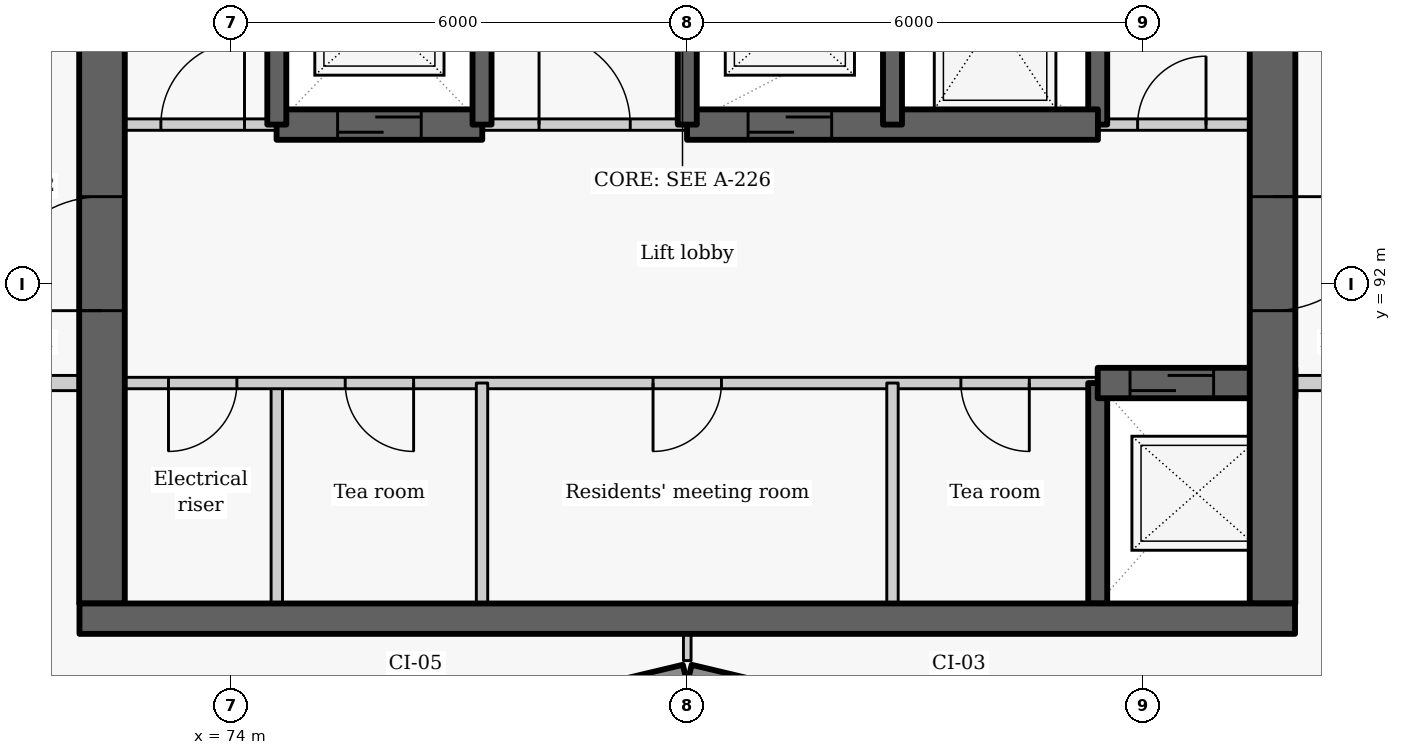
"""IFC4 building model, lengths in metres.
Left out: names, types, materials, properties, quantities, classifications, styles, units other than length and angle.
Written with IfcOpenShell. Run it as: python <this file> out.ifc"""

import sys

from ifc_helpers import new_model, si_unit, direction, frame, frame_2d, origin, place, context, subcontext, project, spatial, rectangle, extrude, element, fill, save


model = new_model("IFC4")
c1 = context("Model", 3, precision=1e-05, world=origin(), true_north=direction((0.0, 1.0)))
c2 = subcontext(c1, "Body", "Model", "MODEL_VIEW")
j1 = project(units=[si_unit("LENGTHUNIT", "METRE"), si_unit("PLANEANGLEUNIT", "RADIAN")], contexts=[c1])
p1 = place(None, origin())
s1 = spatial("IfcSite", under=j1, at=p1, CompositionType="ELEMENT")
p2 = place(p1, origin())
s2 = spatial("IfcBuilding", under=s1, at=p2, CompositionType="ELEMENT")
p3 = place(p2, frame((0.0, 0.0, 140.4)))
s3 = spatial("IfcBuildingStorey", under=s2, at=p3, CompositionType="ELEMENT", Elevation=140.4)
p4 = place(p3, frame((76.814, 86.119, 0.0), z_axis=(0.0, 0.0, 1.0), x_axis=(0.972773113459, 0.231759508395, 0.0)))
e1 = element("IfcWall", 1, at=p4, inside=s3, PredefinedType="SOLIDWALL", context=c2, shape_type="SweptSolid", body=[
    extrude(rectangle(XDim=3.246, YDim=0.25, at=frame_2d((1.623, 0.0))), origin(), (0.0, 0.0, 1.0), 2.425),
])
p5 = place(p4, frame((0.573, 0.0, 0.9)))
e2 = element("IfcOpeningElement", 2, at=p5, cuts=e1, PredefinedType="OPENING", context=c2, shape_type="SweptSolid", body=[
    extrude(rectangle(XDim=2.1, YDim=1.1, at=frame_2d((1.05, 0.55))), frame((0.0, 0.135, 0.0), z_axis=(0.0, -1.0, 0.0), x_axis=(1.0, 0.0, 0.0)), (0.0, 0.0, 1.0), 0.27),
])
p6 = place(p3, frame((80.029, 86.872, 0.0), z_axis=(0.0, 0.0, 1.0), x_axis=(0.972773113459, -0.231759508395, 0.0)))
e3 = element("IfcWall", 3, at=p6, inside=s3, PredefinedType="SOLIDWALL", context=c2, shape_type="SweptSolid", body=[
    extrude(rectangle(XDim=3.246, YDim=0.25, at=frame_2d((1.623, 0.0))), origin(), (0.0, 0.0, 1.0), 2.425),
])
p7 = place(p6, frame((0.573, 0.0, 0.9)))
e4 = element("IfcOpeningElement", 4, at=p7, cuts=e3, PredefinedType="OPENING", context=c2, shape_type="SweptSolid", body=[
    extrude(rectangle(XDim=2.1, YDim=1.1, at=frame_2d((1.05, 0.55))), frame((0.0, 0.135, 0.0), z_axis=(0.0, -1.0, 0.0), x_axis=(1.0, 0.0, 0.0)), (0.0, 0.0, 1.0), 0.27),
])
p8 = place(p3, frame((74.6, 87.8, 0.0), z_axis=(0.0, 0.0, 1.0), x_axis=(0.0, 1.0, 0.0)))
e5 = element("IfcWall", 5, at=p8, inside=s3, PredefinedType="PARTITIONING", context=c2, shape_type="SweptSolid", body=[
    extrude(rectangle(XDim=2.9, YDim=0.15, at=frame_2d((1.45, 0.0))), origin(), (0.0, 0.0, 1.0), 3.025),
])
p9 = place(p3, frame((85.4, 90.7, 0.0), z_axis=(0.0, 0.0, 1.0), x_axis=(-1.0, 0.0, 0.0)))
e6 = element("IfcWall", 6, at=p9, inside=s3, PredefinedType="PARTITIONING", context=c2, shape_type="SweptSolid", body=[
    extrude(rectangle(XDim=13.4, YDim=0.15, at=frame_2d((6.7, 0.0))), origin(), (0.0, 0.0, 1.0), 3.025),
])
p10 = place(p9, frame((11.325, 0.0, 0.0)))
e7 = element("IfcOpeningElement", 7, at=p10, cuts=e6, PredefinedType="OPENING", context=c2, shape_type="SweptSolid", body=[
    extrude(rectangle(XDim=0.9, YDim=2.1, at=frame_2d((0.45, 1.05))), frame((0.0, 0.085, 0.0), z_axis=(0.0, -1.0, 0.0), x_axis=(1.0, 0.0, 0.0)), (0.0, 0.0, 1.0), 0.17),
])
p11 = place(p9, frame((9.0, 0.0, 0.0)))
e8 = element("IfcOpeningElement", 8, at=p11, cuts=e6, PredefinedType="OPENING", context=c2, shape_type="SweptSolid", body=[
    extrude(rectangle(XDim=0.9, YDim=2.1, at=frame_2d((0.45, 1.05))), frame((0.0, 0.085, 0.0), z_axis=(0.0, -1.0, 0.0), x_axis=(1.0, 0.0, 0.0)), (0.0, 0.0, 1.0), 0.17),
])
p12 = place(p9, frame((4.95, 0.0, 0.0)))
e9 = element("IfcOpeningElement", 9, at=p12, cuts=e6, PredefinedType="OPENING", context=c2, shape_type="SweptSolid", body=[
    extrude(rectangle(XDim=0.9, YDim=2.1, at=frame_2d((0.45, 1.05))), frame((0.0, 0.085, 0.0), z_axis=(0.0, -1.0, 0.0), x_axis=(1.0, 0.0, 0.0)), (0.0, 0.0, 1.0), 0.17),
])
p13 = place(p9, frame((0.9, 0.0, 0.0)))
e10 = element("IfcOpeningElement", 10, at=p13, cuts=e6, PredefinedType="OPENING", context=c2, shape_type="SweptSolid", body=[
    extrude(rectangle(XDim=0.9, YDim=2.1, at=frame_2d((0.45, 1.05))), frame((0.0, 0.085, 0.0), z_axis=(0.0, -1.0, 0.0), x_axis=(1.0, 0.0, 0.0)), (0.0, 0.0, 1.0), 0.17),
])
p14 = place(p3, frame((72.3, 87.8, -0.275), z_axis=(0.0, 0.0, 1.0), x_axis=(0.0, 1.0, 0.0)))
e11 = element("IfcWall", 11, at=p14, inside=s3, PredefinedType="SHEAR", context=c2, shape_type="SweptSolid", body=[
    extrude(rectangle(XDim=9.1, YDim=0.6, at=frame_2d((4.55, 0.0))), origin(), (0.0, 0.0, 1.0), 3.3),
])
p15 = place(p14, frame((3.852, 0.0, 0.275)))
e12 = element("IfcOpeningElement", 12, at=p15, cuts=e11, PredefinedType="OPENING", context=c2, shape_type="SweptSolid", body=[
    extrude(rectangle(XDim=1.5, YDim=2.1, at=frame_2d((0.75, 1.05))), frame((0.0, 0.31, 0.0), z_axis=(0.0, -1.0, 0.0), x_axis=(1.0, 0.0, 0.0)), (0.0, 0.0, 1.0), 0.62),
])
p16 = place(p3, frame((85.4, 87.8, -0.275), z_axis=(0.0, 0.0, 1.0), x_axis=(0.0, 1.0, 0.0)))
e13 = element("IfcWall", 13, at=p16, inside=s3, PredefinedType="SHEAR", context=c2, shape_type="SweptSolid", body=[
    extrude(rectangle(XDim=2.9, YDim=0.25, at=frame_2d((1.45, 0.0))), origin(), (0.0, 0.0, 1.0), 3.3),
])
p17 = place(p3, frame((85.4, 94.1, -0.275), z_axis=(0.0, 0.0, 1.0), x_axis=(0.0, 1.0, 0.0)))
e14 = element("IfcWall", 14, at=p17, inside=s3, PredefinedType="SHEAR", context=c2, shape_type="SweptSolid", body=[
    extrude(rectangle(XDim=2.8, YDim=0.25, at=frame_2d((1.4, 0.0))), origin(), (0.0, 0.0, 1.0), 3.3),
])
p18 = place(p3, frame((85.4, 90.7, -0.275), z_axis=(0.0, 0.0, 1.0), x_axis=(1.0, 0.0, 0.0)))
e15 = element("IfcWall", 15, at=p18, inside=s3, PredefinedType="SHEAR", context=c2, shape_type="SweptSolid", body=[
    extrude(rectangle(XDim=2.6, YDim=0.4, at=frame_2d((1.3, 0.0))), origin(), (0.0, 0.0, 1.0), 3.3),
])
p19 = place(p18, frame((0.425, 0.0, 0.275)))
e16 = element("IfcOpeningElement", 16, at=p19, cuts=e15, PredefinedType="OPENING", context=c2, shape_type="SweptSolid", body=[
    extrude(rectangle(XDim=1.1, YDim=2.1, at=frame_2d((0.55, 1.05))), frame((0.0, 0.21, 0.0), z_axis=(0.0, -1.0, 0.0), x_axis=(1.0, 0.0, 0.0)), (0.0, 0.0, 1.0), 0.42),
])
p20 = place(p3, frame((87.7, 103.4, -0.275), z_axis=(0.0, 0.0, 1.0), x_axis=(0.0, -1.0, 0.0)))
e17 = element("IfcWall", 17, at=p20, inside=s3, PredefinedType="SHEAR", context=c2, shape_type="SweptSolid", body=[
    extrude(rectangle(XDim=15.6, YDim=0.6, at=frame_2d((7.8, 0.0))), origin(), (0.0, 0.0, 1.0), 3.3),
])
p21 = place(p20, frame((10.248, 0.0, 0.275)))
e18 = element("IfcOpeningElement", 18, at=p21, cuts=e17, PredefinedType="OPENING", context=c2, shape_type="SweptSolid", body=[
    extrude(rectangle(XDim=1.5, YDim=2.1, at=frame_2d((0.75, 1.05))), frame((0.0, 0.31, 0.0), z_axis=(0.0, -1.0, 0.0), x_axis=(1.0, 0.0, 0.0)), (0.0, 0.0, 1.0), 0.62),
])
for number, where, z_axis, x_axis in (
    (19, (77.3, 87.8, 0.0), (0.0, 0.0, 1.0), (0.0, 1.0, 0.0)),
    (20, (82.7, 87.8, 0.0), (0.0, 0.0, 1.0), (0.0, 1.0, 0.0)),
):
    element("IfcWall", number, at=place(p3, frame(where, z_axis=z_axis, x_axis=x_axis)), inside=s3, PredefinedType="PARTITIONING", context=c2, shape_type="SweptSolid", body=[
        extrude(rectangle(XDim=2.9, YDim=0.15, at=frame_2d((1.45, 0.0))), origin(), (0.0, 0.0, 1.0), 3.025),
    ])
p22 = place(p3, frame((72.0, 94.1, 0.0), z_axis=(0.0, 0.0, 1.0), x_axis=(1.0, 0.0, 0.0)))
e21 = element("IfcWall", 21, at=p22, inside=s3, PredefinedType="PARTITIONING", context=c2, shape_type="SweptSolid", body=[
    extrude(rectangle(XDim=2.603, YDim=0.15, at=frame_2d((1.302, 0.0))), origin(), (0.0, 0.0, 1.0), 3.025),
])
p23 = place(p22, frame((1.075, 0.0, 0.0)))
e22 = element("IfcOpeningElement", 22, at=p23, cuts=e21, PredefinedType="OPENING", context=c2, shape_type="SweptSolid", body=[
    extrude(rectangle(XDim=1.1, YDim=2.1, at=frame_2d((0.55, 1.05))), frame((0.0, 0.085, 0.0), z_axis=(0.0, -1.0, 0.0), x_axis=(1.0, 0.0, 0.0)), (0.0, 0.0, 1.0), 0.17),
])
p24 = place(p3, frame((77.297, 94.1, 0.0), z_axis=(0.0, 0.0, 1.0), x_axis=(1.0, 0.0, 0.0)))
e23 = element("IfcWall", 23, at=p24, inside=s3, PredefinedType="PARTITIONING", context=c2, shape_type="SweptSolid", body=[
    extrude(rectangle(XDim=2.706, YDim=0.15, at=frame_2d((1.353, 0.0))), origin(), (0.0, 0.0, 1.0), 3.025),
])
p25 = place(p24, frame((0.753, 0.0, 0.0)))
e24 = element("IfcOpeningElement", 24, at=p25, cuts=e23, PredefinedType="OPENING", context=c2, shape_type="SweptSolid", body=[
    extrude(rectangle(XDim=1.2, YDim=2.1, at=frame_2d((0.6, 1.05))), frame((0.0, 0.085, 0.0), z_axis=(0.0, -1.0, 0.0), x_axis=(1.0, 0.0, 0.0)), (0.0, 0.0, 1.0), 0.17),
])
p26 = place(p3, frame((85.397, 94.1, 0.0), z_axis=(0.0, 0.0, 1.0), x_axis=(1.0, 0.0, 0.0)))
e25 = element("IfcWall", 25, at=p26, inside=s3, PredefinedType="PARTITIONING", context=c2, shape_type="SweptSolid", body=[
    extrude(rectangle(XDim=2.603, YDim=0.15, at=frame_2d((1.302, 0.0))), origin(), (0.0, 0.0, 1.0), 3.025),
])
p27 = place(p26, frame((0.528, 0.0, 0.0)))
e26 = element("IfcOpeningElement", 26, at=p27, cuts=e25, PredefinedType="OPENING", context=c2, shape_type="SweptSolid", body=[
    extrude(rectangle(XDim=0.9, YDim=2.1, at=frame_2d((0.45, 1.05))), frame((0.0, 0.085, 0.0), z_axis=(0.0, -1.0, 0.0), x_axis=(1.0, 0.0, 0.0)), (0.0, 0.0, 1.0), 0.17),
])
p28 = place(p3, frame((74.597, 94.1, -0.275), z_axis=(0.0, 0.0, 1.0), x_axis=(1.0, 0.0, 0.0)))
e27 = element("IfcWall", 27, at=p28, inside=s3, PredefinedType="SHEAR", context=c2, shape_type="SweptSolid", body=[
    extrude(rectangle(XDim=2.706, YDim=0.4, at=frame_2d((1.353, 0.0))), origin(), (0.0, 0.0, 1.0), 3.3),
])
p29 = place(p28, frame((0.803, 0.0, 0.275)))
e28 = element("IfcOpeningElement", 28, at=p29, cuts=e27, PredefinedType="OPENING", context=c2, shape_type="SweptSolid", body=[
    extrude(rectangle(XDim=1.1, YDim=2.1, at=frame_2d((0.55, 1.05))), frame((0.0, 0.21, 0.0), z_axis=(0.0, -1.0, 0.0), x_axis=(1.0, 0.0, 0.0)), (0.0, 0.0, 1.0), 0.42),
])
p30 = place(p3, frame((79.997, 94.1, -0.275), z_axis=(0.0, 0.0, 1.0), x_axis=(1.0, 0.0, 0.0)))
e29 = element("IfcWall", 29, at=p30, inside=s3, PredefinedType="SHEAR", context=c2, shape_type="SweptSolid", body=[
    extrude(rectangle(XDim=5.406, YDim=0.4, at=frame_2d((2.703, 0.0))), origin(), (0.0, 0.0, 1.0), 3.3),
])
p31 = place(p30, frame((0.803, 0.0, 0.275)))
e30 = element("IfcOpeningElement", 30, at=p31, cuts=e29, PredefinedType="OPENING", context=c2, shape_type="SweptSolid", body=[
    extrude(rectangle(XDim=1.1, YDim=2.1, at=frame_2d((0.55, 1.05))), frame((0.0, 0.21, 0.0), z_axis=(0.0, -1.0, 0.0), x_axis=(1.0, 0.0, 0.0)), (0.0, 0.0, 1.0), 0.42),
])
for number, where, z_axis, x_axis in (
    (31, (74.6, 94.1, -0.275), (0.0, 0.0, 1.0), (0.0, 1.0, 0.0)),
    (32, (77.3, 94.1, -0.275), (0.0, 0.0, 1.0), (0.0, 1.0, 0.0)),
    (33, (80.0, 94.1, -0.275), (0.0, 0.0, 1.0), (0.0, 1.0, 0.0)),
    (34, (82.7, 94.1, -0.275), (0.0, 0.0, 1.0), (0.0, 1.0, 0.0)),
):
    element("IfcWall", number, at=place(p3, frame(where, z_axis=z_axis, x_axis=x_axis)), inside=s3, PredefinedType="SHEAR", context=c2, shape_type="SweptSolid", body=[
        extrude(rectangle(XDim=2.8, YDim=0.25, at=frame_2d((1.4, 0.0))), origin(), (0.0, 0.0, 1.0), 3.3),
    ])
for number, where, z_axis, x_axis in (
    (35, (70.45, 90.7, 0.0), (0.0, 0.0, 1.0), (1.0, 0.0, 0.0)),
    (36, (88.0, 90.7, 0.0), (0.0, 0.0, 1.0), (1.0, 0.0, 0.0)),
):
    element("IfcWall", number, at=place(p3, frame(where, z_axis=z_axis, x_axis=x_axis)), inside=s3, PredefinedType="PARTITIONING", context=c2, shape_type="SweptSolid", body=[
        extrude(rectangle(XDim=1.55, YDim=0.2, at=frame_2d((0.775, 0.0))), origin(), (0.0, 0.0, 1.0), 3.025),
    ])
p32 = place(p3, frame((80.0, 87.048, 0.0), z_axis=(0.0, 0.0, 1.0), x_axis=(0.0, 1.0, 0.0)))
e37 = element("IfcWall", 37, at=p32, inside=s3, PredefinedType="PARTITIONING", context=c2, shape_type="SweptSolid", body=[
    extrude(rectangle(XDim=0.352, YDim=0.1, at=frame_2d((0.176, 0.0))), origin(), (0.0, 0.0, 1.0), 3.025),
])
p33 = place(p3, frame((72.004, 87.6, -0.275), z_axis=(0.0, 0.0, 1.0), x_axis=(1.0, 0.0, 0.0)))
e38 = element("IfcWall", 38, at=p33, inside=s3, PredefinedType="SHEAR", context=c2, shape_type="SweptSolid", body=[
    extrude(rectangle(XDim=15.992, YDim=0.4, at=frame_2d((7.996, 0.0))), origin(), (0.0, 0.0, 1.0), 3.3),
])
p34 = place(p10, origin())
e39 = element("IfcDoor", 39, at=p34, inside=s3, OperationType="SINGLE_SWING_RIGHT", PredefinedType="DOOR", context=c2, shape_type="SweptSolid", body=[
    extrude(rectangle(XDim=0.9, YDim=2.1, at=frame_2d((0.45, 1.05))), frame((0.0, 0.025, 0.0), z_axis=(0.0, -1.0, 0.0), x_axis=(1.0, 0.0, 0.0)), (0.0, 0.0, 1.0), 0.05),
])
fill(e7, e39)
p35 = place(p19, origin())
e40 = element("IfcDoor", 40, at=p35, inside=s3, OperationType="SLIDING_TO_LEFT", PredefinedType="DOOR", context=c2, shape_type="SweptSolid", body=[
    extrude(rectangle(XDim=1.1, YDim=2.1, at=frame_2d((0.55, 1.05))), frame((0.0, 0.025, 0.0), z_axis=(0.0, -1.0, 0.0), x_axis=(1.0, 0.0, 0.0)), (0.0, 0.0, 1.0), 0.05),
])
fill(e16, e40)
p36 = place(p11, origin())
e41 = element("IfcDoor", 41, at=p36, inside=s3, OperationType="SINGLE_SWING_LEFT", PredefinedType="DOOR", context=c2, shape_type="SweptSolid", body=[
    extrude(rectangle(XDim=0.9, YDim=2.1, at=frame_2d((0.45, 1.05))), frame((0.0, 0.025, 0.0), z_axis=(0.0, -1.0, 0.0), x_axis=(1.0, 0.0, 0.0)), (0.0, 0.0, 1.0), 0.05),
])
fill(e8, e41)
p37 = place(p12, origin())
e42 = element("IfcDoor", 42, at=p37, inside=s3, OperationType="SINGLE_SWING_RIGHT", PredefinedType="DOOR", context=c2, shape_type="SweptSolid", body=[
    extrude(rectangle(XDim=0.9, YDim=2.1, at=frame_2d((0.45, 1.05))), frame((0.0, 0.025, 0.0), z_axis=(0.0, -1.0, 0.0), x_axis=(1.0, 0.0, 0.0)), (0.0, 0.0, 1.0), 0.05),
])
fill(e9, e42)
p38 = place(p13, origin())
e43 = element("IfcDoor", 43, at=p38, inside=s3, OperationType="SINGLE_SWING_LEFT", PredefinedType="DOOR", context=c2, shape_type="SweptSolid", body=[
    extrude(rectangle(XDim=0.9, YDim=2.1, at=frame_2d((0.45, 1.05))), frame((0.0, 0.025, 0.0), z_axis=(0.0, -1.0, 0.0), x_axis=(1.0, 0.0, 0.0)), (0.0, 0.0, 1.0), 0.05),
])
fill(e10, e43)
p39 = place(p23, origin())
e44 = element("IfcDoor", 44, at=p39, inside=s3, OperationType="SINGLE_SWING_RIGHT", PredefinedType="DOOR", context=c2, shape_type="SweptSolid", body=[
    extrude(rectangle(XDim=1.1, YDim=2.1, at=frame_2d((0.55, 1.05))), frame((0.0, 0.025, 0.0), z_axis=(0.0, -1.0, 0.0), x_axis=(1.0, 0.0, 0.0)), (0.0, 0.0, 1.0), 0.05),
])
fill(e22, e44)
p40 = place(p29, origin())
e45 = element("IfcDoor", 45, at=p40, inside=s3, OperationType="SLIDING_TO_LEFT", PredefinedType="DOOR", context=c2, shape_type="SweptSolid", body=[
    extrude(rectangle(XDim=1.1, YDim=2.1, at=frame_2d((0.55, 1.05))), frame((0.0, 0.025, 0.0), z_axis=(0.0, -1.0, 0.0), x_axis=(1.0, 0.0, 0.0)), (0.0, 0.0, 1.0), 0.05),
])
fill(e28, e45)
p41 = place(p25, origin())
e46 = element("IfcDoor", 46, at=p41, inside=s3, OperationType="DOUBLE_DOOR_SINGLE_SWING", PredefinedType="DOOR", context=c2, shape_type="SweptSolid", body=[
    extrude(rectangle(XDim=1.2, YDim=2.1, at=frame_2d((0.6, 1.05))), frame((0.0, 0.025, 0.0), z_axis=(0.0, -1.0, 0.0), x_axis=(1.0, 0.0, 0.0)), (0.0, 0.0, 1.0), 0.05),
])
fill(e24, e46)
p42 = place(p31, origin())
e47 = element("IfcDoor", 47, at=p42, inside=s3, OperationType="SLIDING_TO_LEFT", PredefinedType="DOOR", context=c2, shape_type="SweptSolid", body=[
    extrude(rectangle(XDim=1.1, YDim=2.1, at=frame_2d((0.55, 1.05))), frame((0.0, 0.025, 0.0), z_axis=(0.0, -1.0, 0.0), x_axis=(1.0, 0.0, 0.0)), (0.0, 0.0, 1.0), 0.05),
])
fill(e30, e47)
p43 = place(p27, origin())
e48 = element("IfcDoor", 48, at=p43, inside=s3, OperationType="SINGLE_SWING_RIGHT", PredefinedType="DOOR", context=c2, shape_type="SweptSolid", body=[
    extrude(rectangle(XDim=0.9, YDim=2.1, at=frame_2d((0.45, 1.05))), frame((0.0, 0.025, 0.0), z_axis=(0.0, -1.0, 0.0), x_axis=(1.0, 0.0, 0.0)), (0.0, 0.0, 1.0), 0.05),
])
fill(e26, e48)
p44 = place(p21, origin())
e49 = element("IfcDoor", 49, at=p44, inside=s3, OperationType="DOUBLE_DOOR_SINGLE_SWING", PredefinedType="DOOR", context=c2, shape_type="SweptSolid", body=[
    extrude(rectangle(XDim=1.5, YDim=2.1, at=frame_2d((0.75, 1.05))), frame((0.0, 0.025, 0.0), z_axis=(0.0, -1.0, 0.0), x_axis=(1.0, 0.0, 0.0)), (0.0, 0.0, 1.0), 0.05),
])
fill(e18, e49)
p45 = place(p15, origin())
e50 = element("IfcDoor", 50, at=p45, inside=s3, OperationType="DOUBLE_DOOR_SINGLE_SWING", PredefinedType="DOOR", context=c2, shape_type="SweptSolid", body=[
    extrude(rectangle(XDim=1.5, YDim=2.1, at=frame_2d((0.75, 1.05))), frame((0.0, 0.025, 0.0), z_axis=(0.0, -1.0, 0.0), x_axis=(1.0, 0.0, 0.0)), (0.0, 0.0, 1.0), 0.05),
])
fill(e12, e50)
save(model, sys.argv[1])
